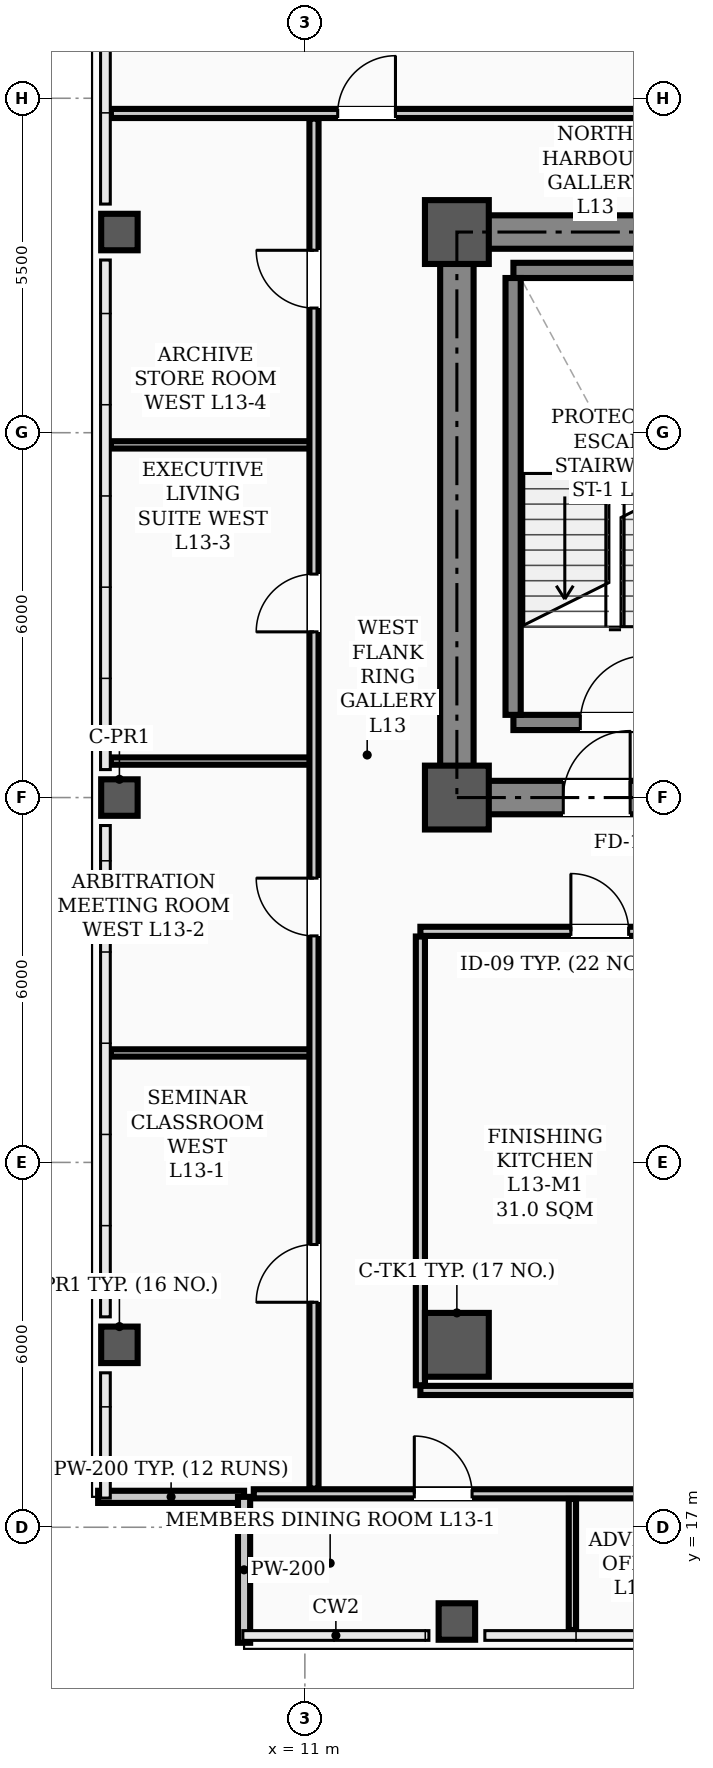
"""IFC4 building model, lengths in metres.
Left out: names, types, materials, properties, quantities, classifications, styles, units other than length and angle.
Written with IfcOpenShell. Run it as: python <this file> out.ifc"""

import sys

from ifc_helpers import new_model, si_unit, direction, frame, frame_2d, origin, origin_2d, place, context, subcontext, project, spatial, rectangle, hollow_rectangle, extrude, element, fill, save


model = new_model("IFC4")
c1 = context("Model", 3, precision=1e-05, world=origin(), true_north=direction((0.0, 1.0)))
c2 = subcontext(c1, "Body", "Model", "MODEL_VIEW")
j1 = project(units=[si_unit("LENGTHUNIT", "METRE"), si_unit("PLANEANGLEUNIT", "RADIAN")], contexts=[c1])
p1 = place(None, origin())
s1 = spatial("IfcSite", under=j1, at=p1, CompositionType="ELEMENT")
p2 = place(p1, origin())
s2 = spatial("IfcBuilding", under=s1, at=p2, CompositionType="ELEMENT")
p3 = place(p2, frame((0.0, 0.0, 53.8)))
s3 = spatial("IfcBuildingStorey", under=s2, at=p3, CompositionType="ELEMENT", Elevation=53.8)
for number, where, z_axis, x_axis in (
    (1, (13.5, 29.0, 0.0), (0.0, 0.0, 1.0), (1.0, 0.0, 0.0)),
    (2, (13.5, 38.3, 0.0), (0.0, 0.0, 1.0), (1.0, 0.0, 0.0)),
    (3, (13.5, 20.0, 0.0), (0.0, 0.0, 1.0), (1.0, 0.0, 0.0)),
):
    element("IfcColumn", number, at=place(p3, frame(where, z_axis=z_axis, x_axis=x_axis)), inside=s3, PredefinedType="COLUMN", context=c2, shape_type="SweptSolid", body=[
        extrude(hollow_rectangle(XDim=1.05, YDim=1.05, WallThickness=0.038, InnerFilletRadius=0.019, OuterFilletRadius=0.057, at=origin_2d()), origin(), (0.0, 0.0, 1.0), 3.9),
    ])
for number, where, z_axis, x_axis in (
    (4, (7.95, 20.0, 0.0), (0.0, 0.0, 1.0), (1.0, 0.0, 0.0)),
    (5, (7.95, 29.0, 0.0), (0.0, 0.0, 1.0), (1.0, 0.0, 0.0)),
    (6, (7.95, 38.3, 0.0), (0.0, 0.0, 1.0), (1.0, 0.0, 0.0)),
    (7, (13.5, 15.45, 0.0), (0.0, 0.0, 1.0), (1.0, 0.0, 0.0)),
):
    element("IfcColumn", number, at=place(p3, frame(where, z_axis=z_axis, x_axis=x_axis)), inside=s3, PredefinedType="COLUMN", context=c2, shape_type="SweptSolid", body=[
        extrude(hollow_rectangle(XDim=0.6, YDim=0.6, WallThickness=0.026, InnerFilletRadius=0.013, OuterFilletRadius=0.039, at=origin_2d()), origin(), (0.0, 0.0, 1.0), 3.9),
    ])
for number, where, z_axis, x_axis in (
    (8, (7.6, 17.5, 0.0), (0.0, 0.0, 1.0), (1.0, 0.0, 0.0)),
    (9, (10.0, 17.5, 0.0), (0.0, 0.0, 1.0), (0.0, -1.0, 0.0)),
):
    element("IfcWall", number, at=place(p3, frame(where, z_axis=z_axis, x_axis=x_axis)), inside=s3, PredefinedType="PARAPET", context=c2, shape_type="SweptSolid", body=[
        extrude(rectangle(XDim=2.4, YDim=0.2, at=frame_2d((1.2, 0.0))), origin(), (0.0, 0.0, 1.0), 1.2),
    ])
p4 = place(p3, frame((13.5, 29.0, 0.0), z_axis=(0.0, 0.0, 1.0), x_axis=(1.0, 0.0, 0.0)))
e10 = element("IfcWall", 10, at=p4, inside=s3, PredefinedType="SHEAR", context=c2, shape_type="SweptSolid", body=[
    extrude(rectangle(XDim=30.5, YDim=0.55, at=frame_2d((15.25, 0.0))), origin(), (0.0, 0.0, 1.0), 3.72),
])
p5 = place(p4, frame((1.75, 0.0, 0.0)))
e11 = element("IfcOpeningElement", 11, at=p5, cuts=e10, PredefinedType="OPENING", context=c2, shape_type="SweptSolid", body=[
    extrude(rectangle(XDim=1.1, YDim=2.08, at=frame_2d((0.55, 1.04))), frame((0.0, 0.285, 0.0), z_axis=(0.0, -1.0, 0.0), x_axis=(1.0, 0.0, 0.0)), (0.0, 0.0, 1.0), 0.57),
])
p6 = place(p4, frame((26.7, 0.0, 0.0)))
e12 = element("IfcOpeningElement", 12, at=p6, cuts=e10, PredefinedType="OPENING", context=c2, shape_type="SweptSolid", body=[
    extrude(rectangle(XDim=1.1, YDim=2.08, at=frame_2d((0.55, 1.04))), frame((0.0, 0.285, 0.0), z_axis=(0.0, -1.0, 0.0), x_axis=(1.0, 0.0, 0.0)), (0.0, 0.0, 1.0), 0.57),
])
p7 = place(p4, frame((6.8, 0.0, 0.0)))
e13 = element("IfcOpeningElement", 13, at=p7, cuts=e10, PredefinedType="OPENING", context=c2, shape_type="SweptSolid", body=[
    extrude(rectangle(XDim=1.1, YDim=2.08, at=frame_2d((0.55, 1.04))), frame((0.0, 0.285, 0.0), z_axis=(0.0, -1.0, 0.0), x_axis=(1.0, 0.0, 0.0)), (0.0, 0.0, 1.0), 0.57),
])
p8 = place(p4, frame((13.2, 0.0, 0.0)))
e14 = element("IfcOpeningElement", 14, at=p8, cuts=e10, PredefinedType="OPENING", context=c2, shape_type="SweptSolid", body=[
    extrude(rectangle(XDim=1.6, YDim=2.08, at=frame_2d((0.8, 1.04))), frame((0.0, 0.285, 0.0), z_axis=(0.0, -1.0, 0.0), x_axis=(1.0, 0.0, 0.0)), (0.0, 0.0, 1.0), 0.57),
])
p9 = place(p4, frame((19.5, 0.0, 0.0)))
e15 = element("IfcOpeningElement", 15, at=p9, cuts=e10, PredefinedType="OPENING", context=c2, shape_type="SweptSolid", body=[
    extrude(rectangle(XDim=0.9, YDim=2.08, at=frame_2d((0.45, 1.04))), frame((0.0, 0.285, 0.0), z_axis=(0.0, -1.0, 0.0), x_axis=(1.0, 0.0, 0.0)), (0.0, 0.0, 1.0), 0.57),
])
p10 = place(p4, frame((21.55, 0.0, 0.0)))
e16 = element("IfcOpeningElement", 16, at=p10, cuts=e10, PredefinedType="OPENING", context=c2, shape_type="SweptSolid", body=[
    extrude(rectangle(XDim=0.9, YDim=2.08, at=frame_2d((0.45, 1.04))), frame((0.0, 0.285, 0.0), z_axis=(0.0, -1.0, 0.0), x_axis=(1.0, 0.0, 0.0)), (0.0, 0.0, 1.0), 0.57),
])
p11 = place(p3, frame((13.5, 38.3, 0.0), z_axis=(0.0, 0.0, 1.0), x_axis=(1.0, 0.0, 0.0)))
e17 = element("IfcWall", 17, at=p11, inside=s3, PredefinedType="SHEAR", context=c2, shape_type="SweptSolid", body=[
    extrude(rectangle(XDim=30.5, YDim=0.55, at=frame_2d((15.25, 0.0))), origin(), (0.0, 0.0, 1.0), 3.72),
])
p12 = place(p3, frame((13.5, 29.35, 0.0), z_axis=(0.0, 0.0, 1.0), x_axis=(0.0, 1.0, 0.0)))
e18 = element("IfcWall", 18, at=p12, inside=s3, PredefinedType="SHEAR", context=c2, shape_type="SweptSolid", body=[
    extrude(rectangle(XDim=8.6, YDim=0.55, at=frame_2d((4.3, 0.0))), origin(), (0.0, 0.0, 1.0), 3.72),
])
p13 = place(p3, frame((14.43, 30.235, 0.0), z_axis=(0.0, 0.0, 1.0), x_axis=(1.0, 0.0, 0.0)))
e19 = element("IfcWall", 19, at=p13, inside=s3, PredefinedType="STANDARD", context=c2, shape_type="SweptSolid", body=[
    extrude(rectangle(XDim=3.34, YDim=0.25, at=frame_2d((1.67, 0.0))), origin(), (0.0, 0.0, 1.0), 3.72),
])
p14 = place(p13, frame((1.1, 0.0, 0.0)))
e20 = element("IfcOpeningElement", 20, at=p14, cuts=e19, PredefinedType="OPENING", context=c2, shape_type="SweptSolid", body=[
    extrude(rectangle(XDim=1.1, YDim=2.08, at=frame_2d((0.55, 1.04))), frame((0.0, 0.135, 0.0), z_axis=(0.0, -1.0, 0.0), x_axis=(1.0, 0.0, 0.0)), (0.0, 0.0, 1.0), 0.27),
])
p15 = place(p3, frame((14.43, 37.669, 0.0), z_axis=(0.0, 0.0, 1.0), x_axis=(1.0, 0.0, 0.0)))
e21 = element("IfcWall", 21, at=p15, inside=s3, PredefinedType="STANDARD", context=c2, shape_type="SweptSolid", body=[
    extrude(rectangle(XDim=3.34, YDim=0.25, at=frame_2d((1.67, 0.0))), origin(), (0.0, 0.0, 1.0), 3.72),
])
p16 = place(p3, frame((14.425, 30.36, 0.0), z_axis=(0.0, 0.0, 1.0), x_axis=(0.0, 1.0, 0.0)))
e22 = element("IfcWall", 22, at=p16, inside=s3, PredefinedType="STANDARD", context=c2, shape_type="SweptSolid", body=[
    extrude(rectangle(XDim=7.184, YDim=0.25, at=frame_2d((3.592, 0.0))), origin(), (0.0, 0.0, 1.0), 3.72),
])
p17 = place(p3, frame((12.9, 26.8, 0.0), z_axis=(0.0, 0.0, 1.0), x_axis=(1.0, 0.0, 0.0)))
e23 = element("IfcWall", 23, at=p17, inside=s3, PredefinedType="PARTITIONING", context=c2, shape_type="SweptSolid", body=[
    extrude(rectangle(XDim=31.7, YDim=0.15, at=frame_2d((15.85, 0.0))), origin(), (0.0, 0.0, 1.0), 3.1),
])
p18 = place(p17, frame((13.6, 0.0, 0.0)))
e24 = element("IfcOpeningElement", 24, at=p18, cuts=e23, PredefinedType="OPENING", context=c2, shape_type="SweptSolid", body=[
    extrude(rectangle(XDim=1.6, YDim=2.08, at=frame_2d((0.8, 1.04))), frame((0.0, 0.085, 0.0), z_axis=(0.0, -1.0, 0.0), x_axis=(1.0, 0.0, 0.0)), (0.0, 0.0, 1.0), 0.17),
])
p19 = place(p17, frame((2.475, 0.0, 0.0)))
e25 = element("IfcOpeningElement", 25, at=p19, cuts=e23, PredefinedType="OPENING", context=c2, shape_type="SweptSolid", body=[
    extrude(rectangle(XDim=0.95, YDim=2.08, at=frame_2d((0.475, 1.04))), frame((0.0, 0.085, 0.0), z_axis=(0.0, -1.0, 0.0), x_axis=(1.0, 0.0, 0.0)), (0.0, 0.0, 1.0), 0.17),
])
p20 = place(p17, frame((5.725, 0.0, 0.0)))
e26 = element("IfcOpeningElement", 26, at=p20, cuts=e23, PredefinedType="OPENING", context=c2, shape_type="SweptSolid", body=[
    extrude(rectangle(XDim=0.95, YDim=2.08, at=frame_2d((0.475, 1.04))), frame((0.0, 0.085, 0.0), z_axis=(0.0, -1.0, 0.0), x_axis=(1.0, 0.0, 0.0)), (0.0, 0.0, 1.0), 0.17),
])
p21 = place(p17, frame((8.875, 0.0, 0.0)))
e27 = element("IfcOpeningElement", 27, at=p21, cuts=e23, PredefinedType="OPENING", context=c2, shape_type="SweptSolid", body=[
    extrude(rectangle(XDim=0.95, YDim=2.08, at=frame_2d((0.475, 1.04))), frame((0.0, 0.085, 0.0), z_axis=(0.0, -1.0, 0.0), x_axis=(1.0, 0.0, 0.0)), (0.0, 0.0, 1.0), 0.17),
])
p22 = place(p17, frame((16.075, 0.0, 0.0)))
e28 = element("IfcOpeningElement", 28, at=p22, cuts=e23, PredefinedType="OPENING", context=c2, shape_type="SweptSolid", body=[
    extrude(rectangle(XDim=0.95, YDim=2.08, at=frame_2d((0.475, 1.04))), frame((0.0, 0.085, 0.0), z_axis=(0.0, -1.0, 0.0), x_axis=(1.0, 0.0, 0.0)), (0.0, 0.0, 1.0), 0.17),
])
p23 = place(p17, frame((22.525, 0.0, 0.0)))
e29 = element("IfcOpeningElement", 29, at=p23, cuts=e23, PredefinedType="OPENING", context=c2, shape_type="SweptSolid", body=[
    extrude(rectangle(XDim=0.95, YDim=2.08, at=frame_2d((0.475, 1.04))), frame((0.0, 0.085, 0.0), z_axis=(0.0, -1.0, 0.0), x_axis=(1.0, 0.0, 0.0)), (0.0, 0.0, 1.0), 0.17),
])
p24 = place(p17, frame((28.825, 0.0, 0.0)))
e30 = element("IfcOpeningElement", 30, at=p24, cuts=e23, PredefinedType="OPENING", context=c2, shape_type="SweptSolid", body=[
    extrude(rectangle(XDim=0.95, YDim=2.08, at=frame_2d((0.475, 1.04))), frame((0.0, 0.085, 0.0), z_axis=(0.0, -1.0, 0.0), x_axis=(1.0, 0.0, 0.0)), (0.0, 0.0, 1.0), 0.17),
])
p25 = place(p3, frame((10.16, 17.55, 0.0), z_axis=(0.0, 0.0, 1.0), x_axis=(1.0, 0.0, 0.0)))
e31 = element("IfcWall", 31, at=p25, inside=s3, PredefinedType="PARTITIONING", context=c2, shape_type="SweptSolid", body=[
    extrude(rectangle(XDim=44.68, YDim=0.15, at=frame_2d((22.34, 0.0))), origin(), (0.0, 0.0, 1.0), 3.1),
])
p26 = place(p25, frame((2.64, 0.0, 0.0)))
e32 = element("IfcOpeningElement", 32, at=p26, cuts=e31, PredefinedType="OPENING", context=c2, shape_type="SweptSolid", body=[
    extrude(rectangle(XDim=0.95, YDim=2.08, at=frame_2d((0.475, 1.04))), frame((0.0, 0.085, 0.0), z_axis=(0.0, -1.0, 0.0), x_axis=(1.0, 0.0, 0.0)), (0.0, 0.0, 1.0), 0.17),
])
p27 = place(p25, frame((8.965, 0.0, 0.0)))
e33 = element("IfcOpeningElement", 33, at=p27, cuts=e31, PredefinedType="OPENING", context=c2, shape_type="SweptSolid", body=[
    extrude(rectangle(XDim=0.95, YDim=2.08, at=frame_2d((0.475, 1.04))), frame((0.0, 0.085, 0.0), z_axis=(0.0, -1.0, 0.0), x_axis=(1.0, 0.0, 0.0)), (0.0, 0.0, 1.0), 0.17),
])
p28 = place(p25, frame((23.815, 0.0, 0.0)))
e34 = element("IfcOpeningElement", 34, at=p28, cuts=e31, PredefinedType="OPENING", context=c2, shape_type="SweptSolid", body=[
    extrude(rectangle(XDim=0.95, YDim=2.08, at=frame_2d((0.475, 1.04))), frame((0.0, 0.085, 0.0), z_axis=(0.0, -1.0, 0.0), x_axis=(1.0, 0.0, 0.0)), (0.0, 0.0, 1.0), 0.17),
])
p29 = place(p25, frame((33.44, 0.0, 0.0)))
e35 = element("IfcOpeningElement", 35, at=p29, cuts=e31, PredefinedType="OPENING", context=c2, shape_type="SweptSolid", body=[
    extrude(rectangle(XDim=0.95, YDim=2.08, at=frame_2d((0.475, 1.04))), frame((0.0, 0.085, 0.0), z_axis=(0.0, -1.0, 0.0), x_axis=(1.0, 0.0, 0.0)), (0.0, 0.0, 1.0), 0.17),
])
p30 = place(p3, frame((12.9, 19.25, 0.0), z_axis=(0.0, 0.0, 1.0), x_axis=(1.0, 0.0, 0.0)))
e36 = element("IfcWall", 36, at=p30, inside=s3, PredefinedType="PARTITIONING", context=c2, shape_type="SweptSolid", body=[
    extrude(rectangle(XDim=13.3, YDim=0.15, at=frame_2d((6.65, 0.0))), origin(), (0.0, 0.0, 1.0), 3.1),
])
p31 = place(p3, frame((7.81, 24.8, 0.0), z_axis=(0.0, 0.0, 1.0), x_axis=(1.0, 0.0, 0.0)))
e37 = element("IfcWall", 37, at=p31, inside=s3, PredefinedType="PARTITIONING", context=c2, shape_type="SweptSolid", body=[
    extrude(rectangle(XDim=3.34, YDim=0.12, at=frame_2d((1.67, 0.0))), origin(), (0.0, 0.0, 1.0), 3.212),
])
p32 = place(p3, frame((7.81, 29.6, 0.0), z_axis=(0.0, 0.0, 1.0), x_axis=(1.0, 0.0, 0.0)))
e38 = element("IfcWall", 38, at=p32, inside=s3, PredefinedType="PARTITIONING", context=c2, shape_type="SweptSolid", body=[
    extrude(rectangle(XDim=3.34, YDim=0.12, at=frame_2d((1.67, 0.0))), origin(), (0.0, 0.0, 1.0), 3.0),
])
p33 = place(p3, frame((7.81, 34.8, 0.0), z_axis=(0.0, 0.0, 1.0), x_axis=(1.0, 0.0, 0.0)))
e39 = element("IfcWall", 39, at=p33, inside=s3, PredefinedType="PARTITIONING", context=c2, shape_type="SweptSolid", body=[
    extrude(rectangle(XDim=3.34, YDim=0.12, at=frame_2d((1.67, 0.0))), origin(), (0.0, 0.0, 1.0), 3.212),
])
p34 = place(p3, frame((7.81, 40.25, 0.0), z_axis=(0.0, 0.0, 1.0), x_axis=(1.0, 0.0, 0.0)))
e40 = element("IfcWall", 40, at=p34, inside=s3, PredefinedType="PARTITIONING", context=c2, shape_type="SweptSolid", body=[
    extrude(rectangle(XDim=49.38, YDim=0.15, at=frame_2d((24.69, 0.0))), origin(), (0.0, 0.0, 1.0), 3.1),
])
p35 = place(p34, frame((3.73, 0.0, 0.0)))
e41 = element("IfcOpeningElement", 41, at=p35, cuts=e40, PredefinedType="OPENING", context=c2, shape_type="SweptSolid", body=[
    extrude(rectangle(XDim=0.95, YDim=2.08, at=frame_2d((0.475, 1.04))), frame((0.0, 0.085, 0.0), z_axis=(0.0, -1.0, 0.0), x_axis=(1.0, 0.0, 0.0)), (0.0, 0.0, 1.0), 0.17),
])
p36 = place(p34, frame((13.815, 0.0, 0.0)))
e42 = element("IfcOpeningElement", 42, at=p36, cuts=e40, PredefinedType="OPENING", context=c2, shape_type="SweptSolid", body=[
    extrude(rectangle(XDim=0.95, YDim=2.08, at=frame_2d((0.475, 1.04))), frame((0.0, 0.085, 0.0), z_axis=(0.0, -1.0, 0.0), x_axis=(1.0, 0.0, 0.0)), (0.0, 0.0, 1.0), 0.17),
])
p37 = place(p34, frame((19.965, 0.0, 0.0)))
e43 = element("IfcOpeningElement", 43, at=p37, cuts=e40, PredefinedType="OPENING", context=c2, shape_type="SweptSolid", body=[
    extrude(rectangle(XDim=0.95, YDim=2.08, at=frame_2d((0.475, 1.04))), frame((0.0, 0.085, 0.0), z_axis=(0.0, -1.0, 0.0), x_axis=(1.0, 0.0, 0.0)), (0.0, 0.0, 1.0), 0.17),
])
p38 = place(p34, frame((30.815, 0.0, 0.0)))
e44 = element("IfcOpeningElement", 44, at=p38, cuts=e40, PredefinedType="OPENING", context=c2, shape_type="SweptSolid", body=[
    extrude(rectangle(XDim=0.95, YDim=2.08, at=frame_2d((0.475, 1.04))), frame((0.0, 0.085, 0.0), z_axis=(0.0, -1.0, 0.0), x_axis=(1.0, 0.0, 0.0)), (0.0, 0.0, 1.0), 0.17),
])
p39 = place(p34, frame((37.2, 0.0, 0.0)))
e45 = element("IfcOpeningElement", 45, at=p39, cuts=e40, PredefinedType="OPENING", context=c2, shape_type="SweptSolid", body=[
    extrude(rectangle(XDim=0.95, YDim=2.08, at=frame_2d((0.475, 1.04))), frame((0.0, 0.085, 0.0), z_axis=(0.0, -1.0, 0.0), x_axis=(1.0, 0.0, 0.0)), (0.0, 0.0, 1.0), 0.17),
])
p40 = place(p3, frame((11.15, 17.635, 0.0), z_axis=(0.0, 0.0, 1.0), x_axis=(0.0, 1.0, 0.0)))
e46 = element("IfcWall", 46, at=p40, inside=s3, PredefinedType="PARTITIONING", context=c2, shape_type="SweptSolid", body=[
    extrude(rectangle(XDim=22.53, YDim=0.15, at=frame_2d((11.265, 0.0))), origin(), (0.0, 0.0, 1.0), 3.0),
])
p41 = place(p40, frame((3.065, 0.0, 0.0)))
e47 = element("IfcOpeningElement", 47, at=p41, cuts=e46, PredefinedType="OPENING", context=c2, shape_type="SweptSolid", body=[
    extrude(rectangle(XDim=0.95, YDim=2.08, at=frame_2d((0.475, 1.04))), frame((0.0, 0.085, 0.0), z_axis=(0.0, -1.0, 0.0), x_axis=(1.0, 0.0, 0.0)), (0.0, 0.0, 1.0), 0.17),
])
p42 = place(p40, frame((9.09, 0.0, 0.0)))
e48 = element("IfcOpeningElement", 48, at=p42, cuts=e46, PredefinedType="OPENING", context=c2, shape_type="SweptSolid", body=[
    extrude(rectangle(XDim=0.95, YDim=2.08, at=frame_2d((0.475, 1.04))), frame((0.0, 0.085, 0.0), z_axis=(0.0, -1.0, 0.0), x_axis=(1.0, 0.0, 0.0)), (0.0, 0.0, 1.0), 0.17),
])
p43 = place(p40, frame((14.09, 0.0, 0.0)))
e49 = element("IfcOpeningElement", 49, at=p43, cuts=e46, PredefinedType="OPENING", context=c2, shape_type="SweptSolid", body=[
    extrude(rectangle(XDim=0.95, YDim=2.08, at=frame_2d((0.475, 1.04))), frame((0.0, 0.085, 0.0), z_axis=(0.0, -1.0, 0.0), x_axis=(1.0, 0.0, 0.0)), (0.0, 0.0, 1.0), 0.17),
])
p44 = place(p40, frame((19.415, 0.0, 0.0)))
e50 = element("IfcOpeningElement", 50, at=p44, cuts=e46, PredefinedType="OPENING", context=c2, shape_type="SweptSolid", body=[
    extrude(rectangle(XDim=0.95, YDim=2.08, at=frame_2d((0.475, 1.04))), frame((0.0, 0.085, 0.0), z_axis=(0.0, -1.0, 0.0), x_axis=(1.0, 0.0, 0.0)), (0.0, 0.0, 1.0), 0.17),
])
p45 = place(p3, frame((12.9, 19.335, 0.0), z_axis=(0.0, 0.0, 1.0), x_axis=(0.0, 1.0, 0.0)))
e51 = element("IfcWall", 51, at=p45, inside=s3, PredefinedType="PARTITIONING", context=c2, shape_type="SweptSolid", body=[
    extrude(rectangle(XDim=7.38, YDim=0.15, at=frame_2d((3.69, 0.0))), origin(), (0.0, 0.0, 1.0), 3.0),
])
p46 = place(p3, frame((15.4, 15.31, 0.0), z_axis=(0.0, 0.0, 1.0), x_axis=(0.0, 1.0, 0.0)))
e52 = element("IfcWall", 52, at=p46, inside=s3, PredefinedType="PARTITIONING", context=c2, shape_type="SweptSolid", body=[
    extrude(rectangle(XDim=2.155, YDim=0.12, at=frame_2d((1.078, 0.0))), origin(), (0.0, 0.0, 1.0), 3.212),
])
p47 = place(p14, origin())
e53 = element("IfcDoor", 53, at=p47, inside=s3, OperationType="SINGLE_SWING_RIGHT", PredefinedType="DOOR", context=c2, shape_type="SweptSolid", body=[
    extrude(rectangle(XDim=1.1, YDim=2.08, at=frame_2d((0.55, 1.04))), frame((0.0, 0.025, 0.0), z_axis=(0.0, -1.0, 0.0), x_axis=(1.0, 0.0, 0.0)), (0.0, 0.0, 1.0), 0.05),
])
fill(e20, e53)
p48 = place(p5, origin())
e54 = element("IfcDoor", 54, at=p48, inside=s3, OperationType="SINGLE_SWING_RIGHT", PredefinedType="DOOR", context=c2, shape_type="SweptSolid", body=[
    extrude(rectangle(XDim=1.1, YDim=2.08, at=frame_2d((0.55, 1.04))), frame((0.0, 0.025, 0.0), z_axis=(0.0, -1.0, 0.0), x_axis=(1.0, 0.0, 0.0)), (0.0, 0.0, 1.0), 0.05),
])
fill(e11, e54)
p49 = place(p26, origin())
e55 = element("IfcDoor", 55, at=p49, inside=s3, OperationType="SINGLE_SWING_LEFT", PredefinedType="DOOR", context=c2, shape_type="SweptSolid", body=[
    extrude(rectangle(XDim=0.95, YDim=2.08, at=frame_2d((0.475, 1.04))), frame((0.0, 0.025, 0.0), z_axis=(0.0, -1.0, 0.0), x_axis=(1.0, 0.0, 0.0)), (0.0, 0.0, 1.0), 0.05),
])
fill(e32, e55)
p50 = place(p19, origin())
e56 = element("IfcDoor", 56, at=p50, inside=s3, OperationType="SINGLE_SWING_LEFT", PredefinedType="DOOR", context=c2, shape_type="SweptSolid", body=[
    extrude(rectangle(XDim=0.95, YDim=2.08, at=frame_2d((0.475, 1.04))), frame((0.0, 0.025, 0.0), z_axis=(0.0, -1.0, 0.0), x_axis=(1.0, 0.0, 0.0)), (0.0, 0.0, 1.0), 0.05),
])
fill(e25, e56)
p51 = place(p41, origin())
e57 = element("IfcDoor", 57, at=p51, inside=s3, OperationType="SINGLE_SWING_LEFT", PredefinedType="DOOR", context=c2, shape_type="SweptSolid", body=[
    extrude(rectangle(XDim=0.95, YDim=2.08, at=frame_2d((0.475, 1.04))), frame((0.0, 0.025, 0.0), z_axis=(0.0, -1.0, 0.0), x_axis=(1.0, 0.0, 0.0)), (0.0, 0.0, 1.0), 0.05),
])
fill(e47, e57)
p52 = place(p42, origin())
e58 = element("IfcDoor", 58, at=p52, inside=s3, OperationType="SINGLE_SWING_RIGHT", PredefinedType="DOOR", context=c2, shape_type="SweptSolid", body=[
    extrude(rectangle(XDim=0.95, YDim=2.08, at=frame_2d((0.475, 1.04))), frame((0.0, 0.025, 0.0), z_axis=(0.0, -1.0, 0.0), x_axis=(1.0, 0.0, 0.0)), (0.0, 0.0, 1.0), 0.05),
])
fill(e48, e58)
p53 = place(p43, origin())
e59 = element("IfcDoor", 59, at=p53, inside=s3, OperationType="SINGLE_SWING_LEFT", PredefinedType="DOOR", context=c2, shape_type="SweptSolid", body=[
    extrude(rectangle(XDim=0.95, YDim=2.08, at=frame_2d((0.475, 1.04))), frame((0.0, 0.025, 0.0), z_axis=(0.0, -1.0, 0.0), x_axis=(1.0, 0.0, 0.0)), (0.0, 0.0, 1.0), 0.05),
])
fill(e49, e59)
p54 = place(p44, origin())
e60 = element("IfcDoor", 60, at=p54, inside=s3, OperationType="SINGLE_SWING_RIGHT", PredefinedType="DOOR", context=c2, shape_type="SweptSolid", body=[
    extrude(rectangle(XDim=0.95, YDim=2.08, at=frame_2d((0.475, 1.04))), frame((0.0, 0.025, 0.0), z_axis=(0.0, -1.0, 0.0), x_axis=(1.0, 0.0, 0.0)), (0.0, 0.0, 1.0), 0.05),
])
fill(e50, e60)
p55 = place(p35, origin())
e61 = element("IfcDoor", 61, at=p55, inside=s3, OperationType="SINGLE_SWING_RIGHT", PredefinedType="DOOR", context=c2, shape_type="SweptSolid", body=[
    extrude(rectangle(XDim=0.95, YDim=2.08, at=frame_2d((0.475, 1.04))), frame((0.0, 0.025, 0.0), z_axis=(0.0, -1.0, 0.0), x_axis=(1.0, 0.0, 0.0)), (0.0, 0.0, 1.0), 0.05),
])
fill(e41, e61)
save(model, sys.argv[1])
